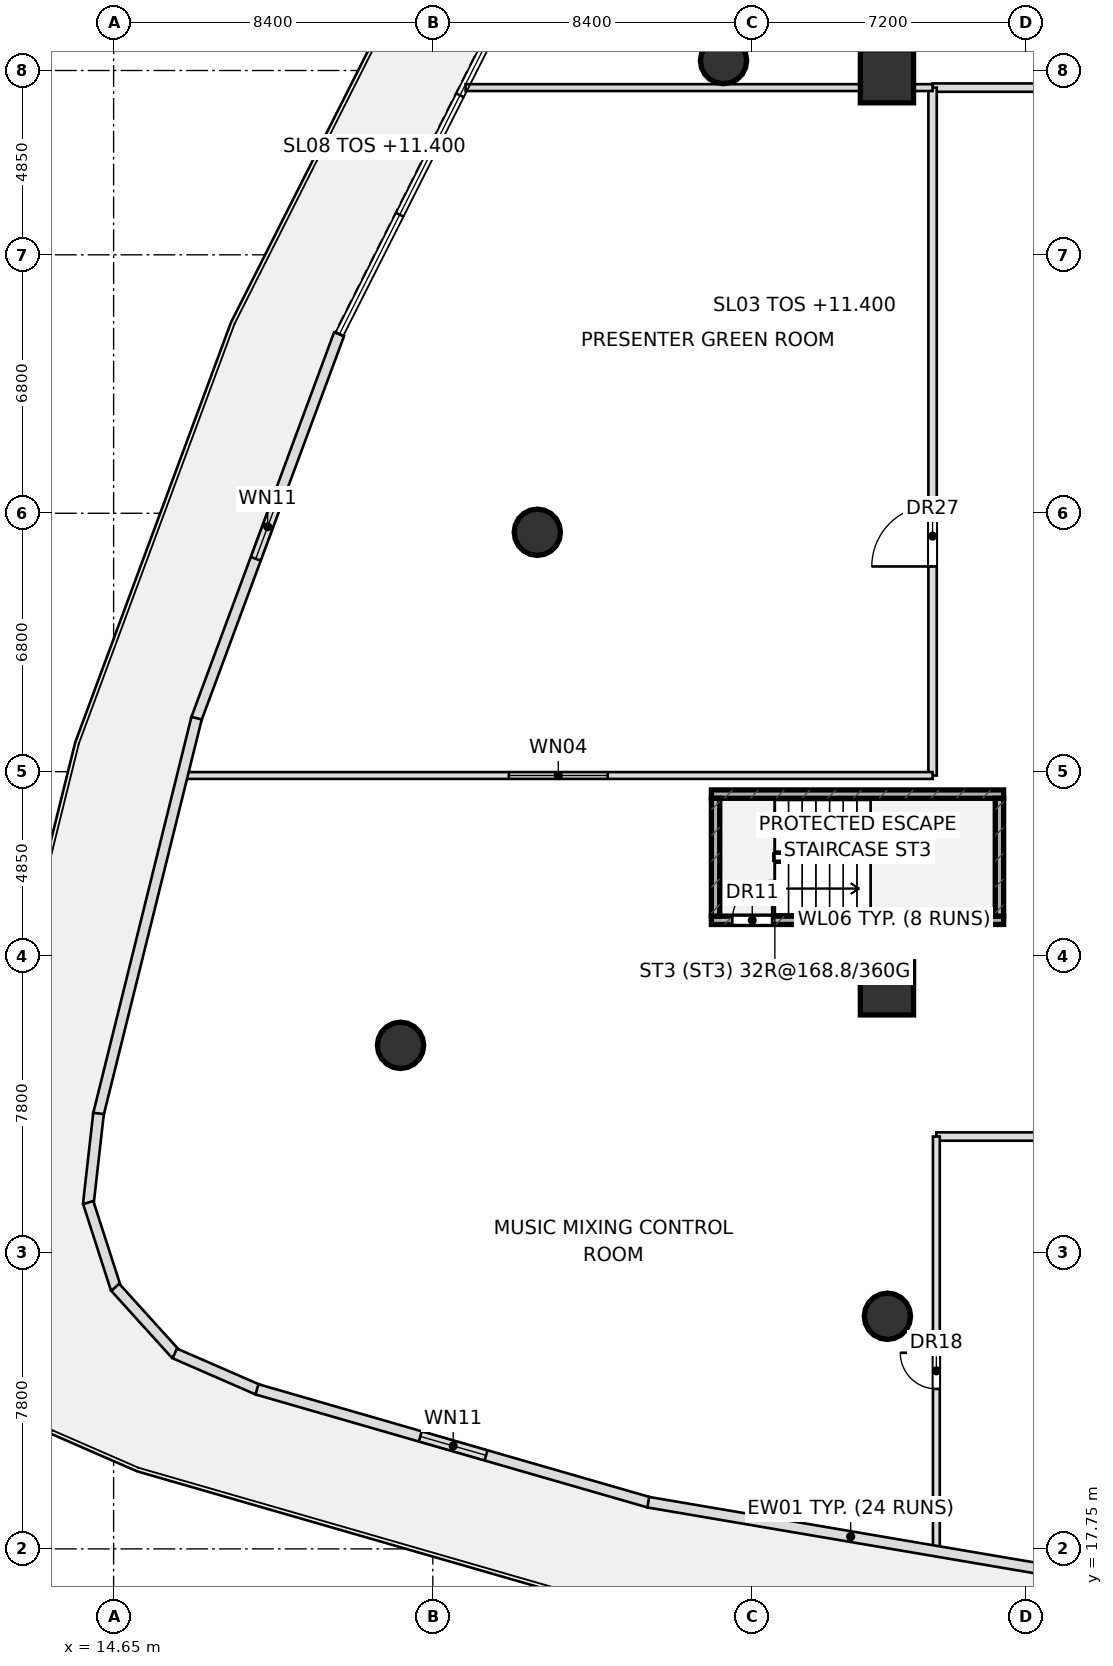
"""IFC4 building model, lengths in metres.
Left out: names, types, materials, properties, quantities, classifications, styles, units other than length and angle.
Written with IfcOpenShell. Run it as: python <this file> out.ifc"""

import sys

from ifc_helpers import new_model, si_unit, direction, frame, frame_2d, origin, origin_2d, place, context, subcontext, project, spatial, rectangle, hollow_circle, extrude, element, fill, save


model = new_model("IFC4")
c1 = context("Model", 3, precision=1e-05, world=origin(), true_north=direction((0.0, 1.0)))
c2 = subcontext(c1, "Body", "Model", "MODEL_VIEW")
j1 = project(units=[si_unit("LENGTHUNIT", "METRE"), si_unit("PLANEANGLEUNIT", "RADIAN")], contexts=[c1])
p1 = place(None, origin())
s1 = spatial("IfcSite", under=j1, at=p1, CompositionType="ELEMENT")
p2 = place(p1, origin())
s2 = spatial("IfcBuilding", under=s1, at=p2, CompositionType="ELEMENT")
p3 = place(p2, frame((0.0, 0.0, 11.4)))
s3 = spatial("IfcBuildingStorey", under=s2, at=p3, CompositionType="ELEMENT", Elevation=11.4)
p4 = place(p3, frame((30.38, 34.29, 0.0), z_axis=(0.0, 0.0, 1.0), x_axis=(1.0, 0.0, 0.0)))
e1 = element("IfcWall", 1, at=p4, inside=s3, PredefinedType="SHEAR", context=c2, shape_type="SweptSolid", body=[
    extrude(rectangle(XDim=7.69, YDim=0.22, at=frame_2d((3.845, 0.0))), origin(), (0.0, 0.0, 1.0), 5.05),
])
p5 = place(p4, frame((0.55, 0.0, 0.0)))
e2 = element("IfcOpeningElement", 2, at=p5, cuts=e1, PredefinedType="OPENING", context=c2, shape_type="SweptSolid", body=[
    extrude(rectangle(XDim=1.05, YDim=2.2, at=frame_2d((0.525, 1.1))), frame((0.0, 0.12, 0.0), z_axis=(0.0, -1.0, 0.0), x_axis=(1.0, 0.0, 0.0)), (0.0, 0.0, 1.0), 0.24),
])
p6 = place(p3, frame((30.38, 37.61, 0.0), z_axis=(0.0, 0.0, 1.0), x_axis=(1.0, 0.0, 0.0)))
e3 = element("IfcWall", 3, at=p6, inside=s3, PredefinedType="SHEAR", context=c2, shape_type="SweptSolid", body=[
    extrude(rectangle(XDim=7.69, YDim=0.22, at=frame_2d((3.845, 0.0))), origin(), (0.0, 0.0, 1.0), 5.05),
])
for number, where, z_axis, x_axis in (
    (4, (37.96, 34.4, 0.0), (0.0, 0.0, 1.0), (0.0, 1.0, 0.0)),
    (5, (30.49, 34.4, 0.0), (0.0, 0.0, 1.0), (0.0, 1.0, 0.0)),
):
    element("IfcWall", number, at=place(p3, frame(where, z_axis=z_axis, x_axis=x_axis)), inside=s3, PredefinedType="SHEAR", context=c2, shape_type="SweptSolid", body=[
        extrude(rectangle(XDim=3.1, YDim=0.22, at=frame_2d((1.55, 0.0))), origin(), (0.0, 0.0, 1.0), 5.05),
    ])
for number, where, z_axis, x_axis in (
    (6, (35.0, 32.5, 0.0), (0.0, 0.0, 1.0), (1.0, 0.0, 0.0)),
    (7, (35.0, 56.5, 0.0), (0.0, 0.0, 1.0), (1.0, 0.0, 0.0)),
):
    element("IfcColumn", number, at=place(p3, frame(where, z_axis=z_axis, x_axis=x_axis)), inside=s3, PredefinedType="COLUMN", context=c2, shape_type="SweptSolid", body=[
        extrude(rectangle(XDim=1.4, YDim=1.4, at=origin_2d()), origin(), (0.0, 0.0, 1.0), 5.05),
    ])
for number, where, z_axis, x_axis in (
    (8, (30.699, 56.911, 0.0), (0.0, 0.0, 1.0), (1.0, 0.0, 0.0)),
    (9, (25.8, 44.5, 0.0), (0.0, 0.0, 1.0), (1.0, 0.0, 0.0)),
    (10, (22.2, 31.0, 0.0), (0.0, 0.0, 1.0), (1.0, 0.0, 0.0)),
    (11, (35.012, 23.871, 0.0), (0.0, 0.0, 1.0), (1.0, 0.0, 0.0)),
):
    element("IfcColumn", number, at=place(p3, frame(where, z_axis=z_axis, x_axis=x_axis)), inside=s3, PredefinedType="COLUMN", context=c2, shape_type="SweptSolid", body=[
        extrude(hollow_circle(Radius=0.61, WallThickness=0.05, at=origin_2d()), origin(), (0.0, 0.0, 1.0), 5.05),
    ])
p7 = place(p3, frame((36.3, 28.6, 0.0), z_axis=(0.0, 0.0, 1.0), x_axis=(1.0, 0.0, 0.0)))
e12 = element("IfcWall", 12, at=p7, inside=s3, PredefinedType="PARTITIONING", context=c2, shape_type="SweptSolid", body=[
    extrude(rectangle(XDim=22.5, YDim=0.22, at=frame_2d((11.25, 0.0))), origin(), (0.0, 0.0, 1.0), 4.125),
])
p8 = place(p7, frame((6.5, 0.0, 0.0)))
e13 = element("IfcOpeningElement", 13, at=p8, cuts=e12, PredefinedType="OPENING", context=c2, shape_type="SweptSolid", body=[
    extrude(rectangle(XDim=1.6, YDim=2.3, at=frame_2d((0.8, 1.15))), frame((0.0, 0.12, 0.0), z_axis=(0.0, -1.0, 0.0), x_axis=(1.0, 0.0, 0.0)), (0.0, 0.0, 1.0), 0.24),
])
p9 = place(p3, frame((36.3, 17.731, 0.0), z_axis=(0.0, 0.0, 1.0), x_axis=(0.0, 1.0, 0.0)))
e14 = element("IfcWall", 14, at=p9, inside=s3, PredefinedType="PARTITIONING", context=c2, shape_type="SweptSolid", body=[
    extrude(rectangle(XDim=10.869, YDim=0.18, at=frame_2d((5.435, 0.0))), origin(), (0.0, 0.0, 1.0), 4.225),
])
p10 = place(p9, frame((4.23, 0.0, 0.0)))
e15 = element("IfcOpeningElement", 15, at=p10, cuts=e14, PredefinedType="OPENING", context=c2, shape_type="SweptSolid", body=[
    extrude(rectangle(XDim=0.95, YDim=2.05, at=frame_2d((0.475, 1.025))), frame((0.0, 0.1, 0.0), z_axis=(0.0, -1.0, 0.0), x_axis=(1.0, 0.0, 0.0)), (0.0, 0.0, 1.0), 0.2),
])
p11 = place(p3, frame((36.2, 56.2, 0.0), z_axis=(0.0, 0.0, 1.0), x_axis=(1.0, 0.0, 0.0)))
e16 = element("IfcWall", 16, at=p11, inside=s3, PredefinedType="PARTITIONING", context=c2, shape_type="SweptSolid", body=[
    extrude(rectangle(XDim=22.6, YDim=0.22, at=frame_2d((11.3, 0.0))), origin(), (0.0, 0.0, 1.0), 5.05),
])
p12 = place(p11, frame((6.5, 0.0, 0.0)))
e17 = element("IfcOpeningElement", 17, at=p12, cuts=e16, PredefinedType="OPENING", context=c2, shape_type="SweptSolid", body=[
    extrude(rectangle(XDim=1.6, YDim=2.3, at=frame_2d((0.8, 1.15))), frame((0.0, 0.12, 0.0), z_axis=(0.0, -1.0, 0.0), x_axis=(1.0, 0.0, 0.0)), (0.0, 0.0, 1.0), 0.24),
])
p13 = place(p3, frame((36.2, 38.1, 0.0), z_axis=(0.0, 0.0, 1.0), x_axis=(0.0, 1.0, 0.0)))
e18 = element("IfcWall", 18, at=p13, inside=s3, PredefinedType="PARTITIONING", context=c2, shape_type="SweptSolid", body=[
    extrude(rectangle(XDim=18.1, YDim=0.22, at=frame_2d((9.05, 0.0))), origin(), (0.0, 0.0, 1.0), 4.125),
])
p14 = place(p13, frame((5.5, 0.0, 0.0)))
e19 = element("IfcOpeningElement", 19, at=p14, cuts=e18, PredefinedType="OPENING", context=c2, shape_type="SweptSolid", body=[
    extrude(rectangle(XDim=1.6, YDim=2.3, at=frame_2d((0.8, 1.15))), frame((0.0, 0.12, 0.0), z_axis=(0.0, -1.0, 0.0), x_axis=(1.0, 0.0, 0.0)), (0.0, 0.0, 1.0), 0.24),
])
p15 = place(p3, frame((16.5, 38.1, 0.0), z_axis=(0.0, 0.0, 1.0), x_axis=(1.0, 0.0, 0.0)))
e20 = element("IfcWall", 20, at=p15, inside=s3, PredefinedType="PARTITIONING", context=c2, shape_type="SweptSolid", body=[
    extrude(rectangle(XDim=19.699, YDim=0.18, at=frame_2d((9.85, 0.0))), origin(), (0.0, 0.0, 1.0), 4.225),
])
p16 = place(p15, frame((8.55, 0.0, 1.05)))
e21 = element("IfcOpeningElement", 21, at=p16, cuts=e20, PredefinedType="OPENING", context=c2, shape_type="SweptSolid", body=[
    extrude(rectangle(XDim=2.6, YDim=1.5, at=frame_2d((1.3, 0.75))), frame((0.0, 0.1, 0.0), z_axis=(0.0, -1.0, 0.0), x_axis=(1.0, 0.0, 0.0)), (0.0, 0.0, 1.0), 0.2),
])
p17 = place(p3, frame((23.912, 56.2, 0.0), z_axis=(0.0, 0.0, 1.0), x_axis=(1.0, 0.0, 0.0)))
e22 = element("IfcWall", 22, at=p17, inside=s3, PredefinedType="PARTITIONING", context=c2, shape_type="SweptSolid", body=[
    extrude(rectangle(XDim=12.288, YDim=0.18, at=frame_2d((6.144, 0.0))), origin(), (0.0, 0.0, 1.0), 4.225),
])
p18 = place(p3, frame((20.583, 49.712, 0.0), z_axis=(0.0, 0.0, 1.0), x_axis=(-0.347783760558, -0.937574773494, 0.0)))
e23 = element("IfcWall", 23, at=p18, inside=s3, PredefinedType="STANDARD", context=c2, shape_type="SweptSolid", body=[
    extrude(rectangle(XDim=10.806, YDim=0.28, at=frame_2d((5.403, 0.0))), origin(), (0.0, 0.0, 1.0), 5.05),
])
p19 = place(p18, frame((4.503, 0.0, 1.0)))
e24 = element("IfcOpeningElement", 24, at=p19, cuts=e23, PredefinedType="OPENING", context=c2, shape_type="SweptSolid", body=[
    extrude(rectangle(XDim=1.8, YDim=2.2, at=frame_2d((0.9, 1.1))), frame((0.0, 0.15, 0.0), z_axis=(0.0, -1.0, 0.0), x_axis=(1.0, 0.0, 0.0)), (0.0, 0.0, 1.0), 0.3),
])
p20 = place(p3, frame((16.833, 39.609, 0.0), z_axis=(0.0, 0.0, 1.0), x_axis=(-0.240573262199, -0.970630983183, 0.0)))
e25 = element("IfcWall", 25, at=p20, inside=s3, PredefinedType="STANDARD", context=c2, shape_type="SweptSolid", body=[
    extrude(rectangle(XDim=10.746, YDim=0.28, at=frame_2d((5.373, 0.0))), origin(), (0.0, 0.0, 1.0), 5.05),
])
p21 = place(p3, frame((14.253, 29.208, 0.0), z_axis=(0.0, 0.0, 1.0), x_axis=(-0.112359618556, -0.993667608468, 0.0)))
e26 = element("IfcWall", 26, at=p21, inside=s3, PredefinedType="STANDARD", context=c2, shape_type="SweptSolid", body=[
    extrude(rectangle(XDim=2.39, YDim=0.28, at=frame_2d((1.195, 0.0))), origin(), (0.0, 0.0, 1.0), 5.05),
])
p22 = place(p3, frame((13.982, 26.862, 0.0), z_axis=(0.0, 0.0, 1.0), x_axis=(0.30659625248, -0.951839659799, 0.0)))
e27 = element("IfcWall", 27, at=p22, inside=s3, PredefinedType="STANDARD", context=c2, shape_type="SweptSolid", body=[
    extrude(rectangle(XDim=2.369, YDim=0.28, at=frame_2d((1.185, 0.0))), origin(), (0.0, 0.0, 1.0), 5.05),
])
p23 = place(p3, frame((14.694, 24.633, 0.0), z_axis=(0.0, 0.0, 1.0), x_axis=(0.670983479807, -0.741472298758, 0.0)))
e28 = element("IfcWall", 28, at=p23, inside=s3, PredefinedType="STANDARD", context=c2, shape_type="SweptSolid", body=[
    extrude(rectangle(XDim=2.369, YDim=0.28, at=frame_2d((1.185, 0.0))), origin(), (0.0, 0.0, 1.0), 5.05),
])
p24 = place(p3, frame((16.26, 22.893, 0.0), z_axis=(0.0, 0.0, 1.0), x_axis=(0.916740089729, -0.399484177263, 0.0)))
e29 = element("IfcWall", 29, at=p24, inside=s3, PredefinedType="STANDARD", context=c2, shape_type="SweptSolid", body=[
    extrude(rectangle(XDim=2.39, YDim=0.28, at=frame_2d((1.195, 0.0))), origin(), (0.0, 0.0, 1.0), 5.05),
])
p25 = place(p3, frame((18.422, 21.948, 0.0), z_axis=(0.0, 0.0, 1.0), x_axis=(0.960879186565, -0.276967848002, 0.0)))
e30 = element("IfcWall", 30, at=p25, inside=s3, PredefinedType="STANDARD", context=c2, shape_type="SweptSolid", body=[
    extrude(rectangle(XDim=10.746, YDim=0.28, at=frame_2d((5.373, 0.0))), origin(), (0.0, 0.0, 1.0), 5.05),
])
p26 = place(p25, frame((4.473, 0.0, 1.0)))
e31 = element("IfcOpeningElement", 31, at=p26, cuts=e30, PredefinedType="OPENING", context=c2, shape_type="SweptSolid", body=[
    extrude(rectangle(XDim=1.8, YDim=2.2, at=frame_2d((0.9, 1.1))), frame((0.0, 0.15, 0.0), z_axis=(0.0, -1.0, 0.0), x_axis=(1.0, 0.0, 0.0)), (0.0, 0.0, 1.0), 0.3),
])
p27 = place(p3, frame((28.719, 18.979, 0.0), z_axis=(0.0, 0.0, 1.0), x_axis=(0.985856929161, -0.167589126212, 0.0)))
e32 = element("IfcWall", 32, at=p27, inside=s3, PredefinedType="STANDARD", context=c2, shape_type="SweptSolid", body=[
    extrude(rectangle(XDim=10.806, YDim=0.28, at=frame_2d((5.403, 0.0))), origin(), (0.0, 0.0, 1.0), 5.05),
])
p28 = place(p5, origin())
e33 = element("IfcDoor", 33, at=p28, inside=s3, OperationType="SINGLE_SWING_RIGHT", PredefinedType="DOOR", context=c2, shape_type="SweptSolid", body=[
    extrude(rectangle(XDim=1.05, YDim=2.2, at=frame_2d((0.525, 1.1))), frame((0.0, 0.025, 0.0), z_axis=(0.0, -1.0, 0.0), x_axis=(1.0, 0.0, 0.0)), (0.0, 0.0, 1.0), 0.05),
])
fill(e2, e33)
p29 = place(p10, origin())
e34 = element("IfcDoor", 34, at=p29, inside=s3, OperationType="SINGLE_SWING_RIGHT", PredefinedType="DOOR", context=c2, shape_type="SweptSolid", body=[
    extrude(rectangle(XDim=0.95, YDim=2.05, at=frame_2d((0.475, 1.025))), frame((0.0, 0.025, 0.0), z_axis=(0.0, -1.0, 0.0), x_axis=(1.0, 0.0, 0.0)), (0.0, 0.0, 1.0), 0.05),
])
fill(e15, e34)
p30 = place(p14, origin())
e35 = element("IfcDoor", 35, at=p30, inside=s3, OperationType="SINGLE_SWING_LEFT", PredefinedType="DOOR", context=c2, shape_type="SweptSolid", body=[
    extrude(rectangle(XDim=1.6, YDim=2.3, at=frame_2d((0.8, 1.15))), frame((0.0, 0.025, 0.0), z_axis=(0.0, -1.0, 0.0), x_axis=(1.0, 0.0, 0.0)), (0.0, 0.0, 1.0), 0.05),
])
fill(e19, e35)
p31 = place(p19, origin())
e36 = element("IfcWindow", 36, at=p31, inside=s3, PartitioningType="SINGLE_PANEL", PredefinedType="WINDOW", context=c2, shape_type="SweptSolid", body=[
    extrude(rectangle(XDim=1.8, YDim=2.2, at=frame_2d((0.9, 1.1))), frame((0.0, 0.03, 0.0), z_axis=(0.0, -1.0, 0.0), x_axis=(1.0, 0.0, 0.0)), (0.0, 0.0, 1.0), 0.06),
])
fill(e24, e36)
p32 = place(p26, origin())
e37 = element("IfcWindow", 37, at=p32, inside=s3, PartitioningType="SINGLE_PANEL", PredefinedType="WINDOW", context=c2, shape_type="SweptSolid", body=[
    extrude(rectangle(XDim=1.8, YDim=2.2, at=frame_2d((0.9, 1.1))), frame((0.0, 0.03, 0.0), z_axis=(0.0, -1.0, 0.0), x_axis=(1.0, 0.0, 0.0)), (0.0, 0.0, 1.0), 0.06),
])
fill(e31, e37)
p33 = place(p16, origin())
e38 = element("IfcWindow", 38, at=p33, inside=s3, PartitioningType="SINGLE_PANEL", PredefinedType="WINDOW", context=c2, shape_type="SweptSolid", body=[
    extrude(rectangle(XDim=2.6, YDim=1.5, at=frame_2d((1.3, 0.75))), frame((0.0, 0.03, 0.0), z_axis=(0.0, -1.0, 0.0), x_axis=(1.0, 0.0, 0.0)), (0.0, 0.0, 1.0), 0.06),
])
fill(e21, e38)
save(model, sys.argv[1])
